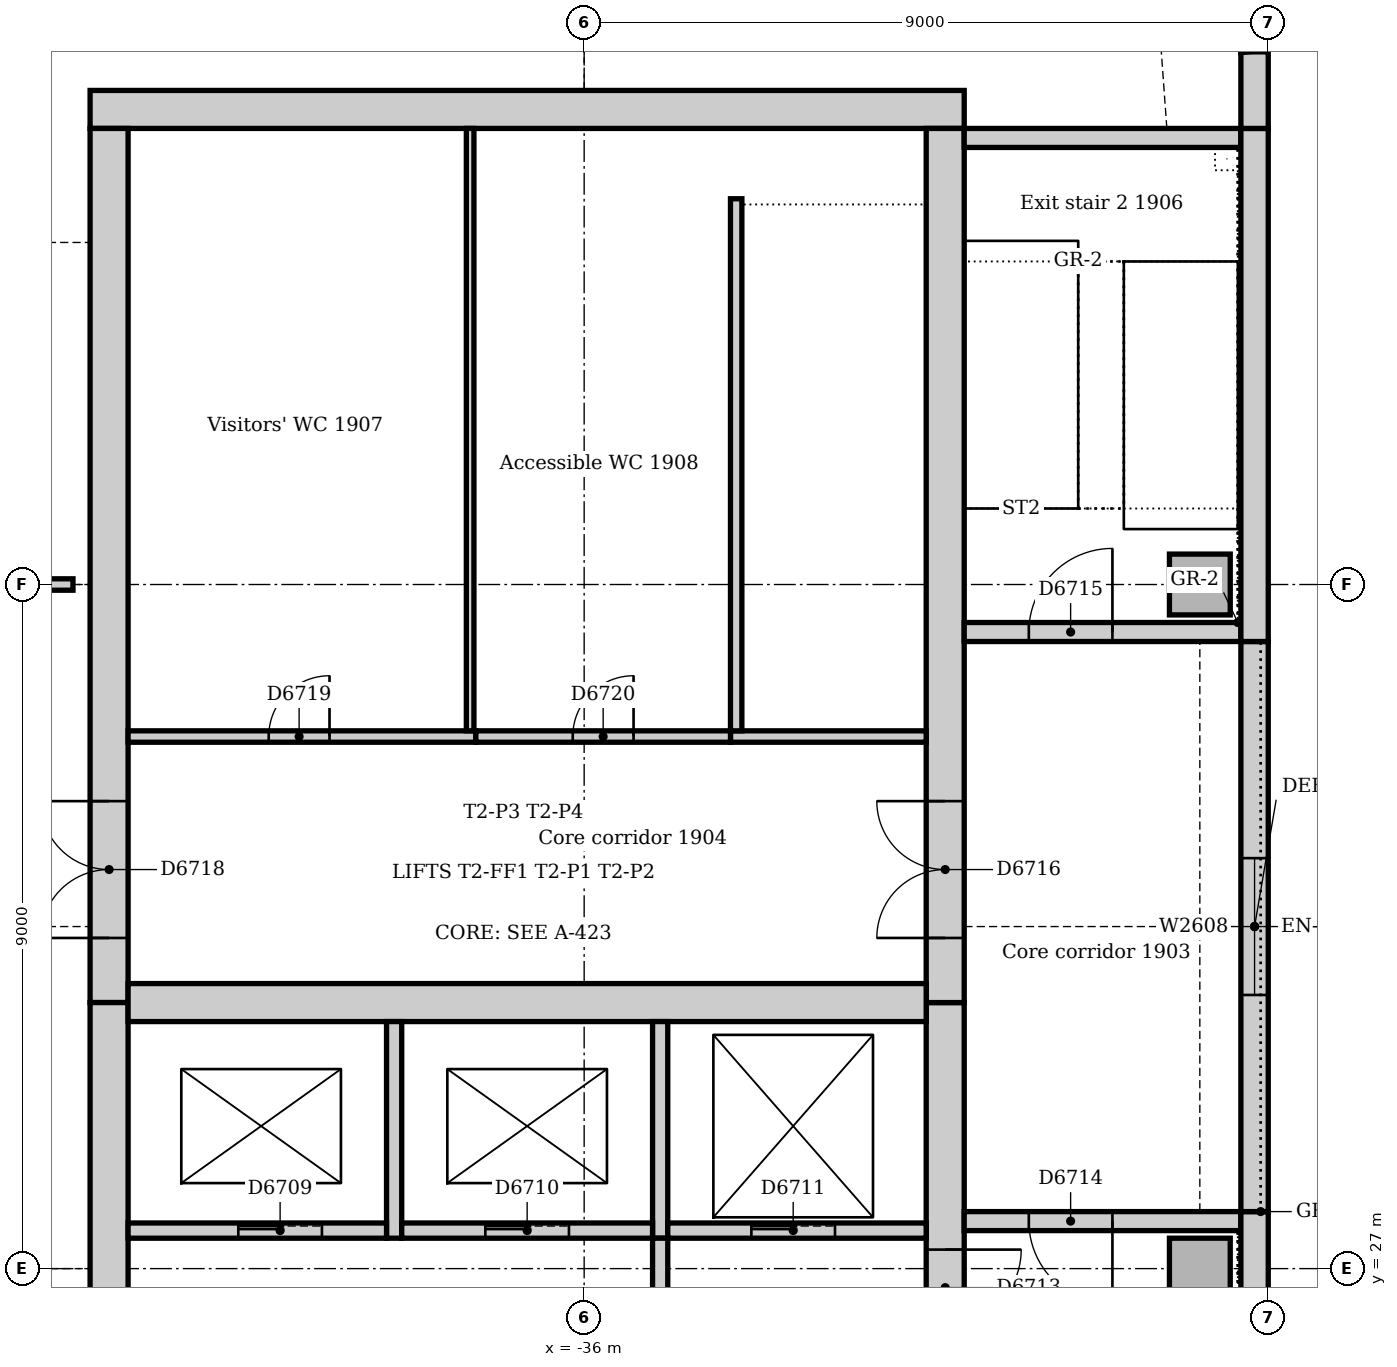
"""IFC4 building model, lengths in metres.
Left out: names, types, materials, properties, quantities, classifications, styles, units other than length and angle.
Written with IfcOpenShell. Run it as: python <this file> out.ifc"""

import sys

from ifc_helpers import new_model, si_unit, direction, frame, frame_2d, origin, origin_2d, place, context, subcontext, project, spatial, rectangle, extrude, element, fill, save


model = new_model("IFC4")
c1 = context("Model", 3, precision=1e-05, world=origin(), true_north=direction((0.0, 1.0)))
c2 = subcontext(c1, "Body", "Model", "MODEL_VIEW")
j1 = project(units=[si_unit("LENGTHUNIT", "METRE"), si_unit("PLANEANGLEUNIT", "RADIAN")], contexts=[c1])
p1 = place(None, origin())
s1 = spatial("IfcSite", under=j1, at=p1, CompositionType="ELEMENT")
p2 = place(p1, origin())
s2 = spatial("IfcBuilding", under=s1, at=p2, CompositionType="ELEMENT")
p3 = place(p2, frame((0.0, 0.0, 83.0)))
s3 = spatial("IfcBuildingStorey", under=s2, at=p3, CompositionType="ELEMENT", Elevation=83.0)
p4 = place(p3, frame((-31.0, 42.25, 0.0), z_axis=(0.0, 0.0, 1.0), x_axis=(-1.0, 0.0, 0.0)))
e1 = element("IfcWall", 1, at=p4, inside=s3, PredefinedType="SOLIDWALL", context=c2, shape_type="SweptSolid", body=[
    extrude(rectangle(XDim=11.5, YDim=0.5, at=frame_2d((5.75, 0.0))), origin(), (0.0, 0.0, 1.0), 4.0),
])
p5 = place(p3, frame((-31.25, 21.0, 0.0), z_axis=(0.0, 0.0, 1.0), x_axis=(0.0, 1.0, 0.0)))
e2 = element("IfcWall", 2, at=p5, inside=s3, PredefinedType="SOLIDWALL", context=c2, shape_type="SweptSolid", body=[
    extrude(rectangle(XDim=9.5, YDim=0.5, at=frame_2d((4.75, 0.0))), origin(), (0.0, 0.0, 1.0), 4.0),
])
p6 = place(p5, frame((5.25, 0.0, 0.0)))
e3 = element("IfcOpeningElement", 3, at=p6, cuts=e2, PredefinedType="OPENING", context=c2, shape_type="SweptSolid", body=[
    extrude(rectangle(XDim=1.0, YDim=2.1, at=frame_2d((0.5, 1.05))), frame((0.0, 0.26, 0.0), z_axis=(0.0, -1.0, 0.0), x_axis=(1.0, 0.0, 0.0)), (0.0, 0.0, 1.0), 0.52),
])
p7 = place(p3, frame((-31.25, 30.5, 0.0), z_axis=(0.0, 0.0, 1.0), x_axis=(0.0, 1.0, 0.0)))
e4 = element("IfcWall", 4, at=p7, inside=s3, PredefinedType="SOLIDWALL", context=c2, shape_type="SweptSolid", body=[
    extrude(rectangle(XDim=11.5, YDim=0.5, at=frame_2d((5.75, 0.0))), origin(), (0.0, 0.0, 1.0), 4.0),
])
p8 = place(p7, frame((0.85, 0.0, 0.0)))
e5 = element("IfcOpeningElement", 5, at=p8, cuts=e4, PredefinedType="OPENING", context=c2, shape_type="SweptSolid", body=[
    extrude(rectangle(XDim=1.8, YDim=2.1, at=frame_2d((0.9, 1.05))), frame((0.0, 0.26, 0.0), z_axis=(0.0, -1.0, 0.0), x_axis=(1.0, 0.0, 0.0)), (0.0, 0.0, 1.0), 0.52),
])
p9 = place(p3, frame((-42.25, 42.0, 0.0), z_axis=(0.0, 0.0, 1.0), x_axis=(0.0, -1.0, 0.0)))
e6 = element("IfcWall", 6, at=p9, inside=s3, PredefinedType="SOLIDWALL", context=c2, shape_type="SweptSolid", body=[
    extrude(rectangle(XDim=11.5, YDim=0.5, at=frame_2d((5.75, 0.0))), origin(), (0.0, 0.0, 1.0), 4.0),
])
p10 = place(p9, frame((8.85, 0.0, 0.0)))
e7 = element("IfcOpeningElement", 7, at=p10, cuts=e6, PredefinedType="OPENING", context=c2, shape_type="SweptSolid", body=[
    extrude(rectangle(XDim=1.8, YDim=2.1, at=frame_2d((0.9, 1.05))), frame((0.0, 0.26, 0.0), z_axis=(0.0, -1.0, 0.0), x_axis=(1.0, 0.0, 0.0)), (0.0, 0.0, 1.0), 0.52),
])
p11 = place(p3, frame((-42.25, 30.5, 0.0), z_axis=(0.0, 0.0, 1.0), x_axis=(0.0, -1.0, 0.0)))
e8 = element("IfcWall", 8, at=p11, inside=s3, PredefinedType="SOLIDWALL", context=c2, shape_type="SweptSolid", body=[
    extrude(rectangle(XDim=9.5, YDim=0.5, at=frame_2d((4.75, 0.0))), origin(), (0.0, 0.0, 1.0), 4.0),
])
p12 = place(p11, frame((3.85, 0.0, 0.0)))
e9 = element("IfcOpeningElement", 9, at=p12, cuts=e8, PredefinedType="OPENING", context=c2, shape_type="SweptSolid", body=[
    extrude(rectangle(XDim=1.8, YDim=2.1, at=frame_2d((0.9, 1.05))), frame((0.0, 0.26, 0.0), z_axis=(0.0, -1.0, 0.0), x_axis=(1.0, 0.0, 0.0)), (0.0, 0.0, 1.0), 0.52),
])
p13 = place(p3, frame((-42.0, 30.5, 0.0), z_axis=(0.0, 0.0, 1.0), x_axis=(1.0, 0.0, 0.0)))
e10 = element("IfcWall", 10, at=p13, inside=s3, PredefinedType="SOLIDWALL", context=c2, shape_type="SweptSolid", body=[
    extrude(rectangle(XDim=10.5, YDim=0.5, at=frame_2d((5.25, 0.0))), origin(), (0.0, 0.0, 1.0), 4.0),
])
p14 = place(p3, frame((-27.36, 27.625, 0.0), z_axis=(0.0, 0.0, 1.0), x_axis=(-1.0, 0.0, 0.0)))
e11 = element("IfcWall", 11, at=p14, inside=s3, PredefinedType="SOLIDWALL", context=c2, shape_type="SweptSolid", body=[
    extrude(rectangle(XDim=3.64, YDim=0.25, at=frame_2d((1.82, 0.0))), origin(), (0.0, 0.0, 1.0), 4.0),
])
p15 = place(p14, frame((1.69, 0.0, 0.0)))
e12 = element("IfcOpeningElement", 12, at=p15, cuts=e11, PredefinedType="OPENING", context=c2, shape_type="SweptSolid", body=[
    extrude(rectangle(XDim=1.1, YDim=2.1, at=frame_2d((0.55, 1.05))), frame((0.0, 0.135, 0.0), z_axis=(0.0, -1.0, 0.0), x_axis=(1.0, 0.0, 0.0)), (0.0, 0.0, 1.0), 0.27),
])
p16 = place(p3, frame((-31.0, 35.375, 0.0), z_axis=(0.0, 0.0, 1.0), x_axis=(1.0, 0.0, 0.0)))
e13 = element("IfcWall", 13, at=p16, inside=s3, PredefinedType="SOLIDWALL", context=c2, shape_type="SweptSolid", body=[
    extrude(rectangle(XDim=3.64, YDim=0.25, at=frame_2d((1.82, 0.0))), origin(), (0.0, 0.0, 1.0), 4.0),
])
p17 = place(p16, frame((0.85, 0.0, 0.0)))
e14 = element("IfcOpeningElement", 14, at=p17, cuts=e13, PredefinedType="OPENING", context=c2, shape_type="SweptSolid", body=[
    extrude(rectangle(XDim=1.1, YDim=2.1, at=frame_2d((0.55, 1.05))), frame((0.0, 0.135, 0.0), z_axis=(0.0, -1.0, 0.0), x_axis=(1.0, 0.0, 0.0)), (0.0, 0.0, 1.0), 0.27),
])
p18 = place(p3, frame((-27.36, 41.875, 0.0), z_axis=(0.0, 0.0, 1.0), x_axis=(-1.0, 0.0, 0.0)))
e15 = element("IfcWall", 15, at=p18, inside=s3, PredefinedType="SOLIDWALL", context=c2, shape_type="SweptSolid", body=[
    extrude(rectangle(XDim=3.64, YDim=0.25, at=frame_2d((1.82, 0.0))), origin(), (0.0, 0.0, 1.0), 4.0),
])
for number, where, z_axis, x_axis in (
    (16, (-27.9, 27.0, 0.0), (0.0, 0.0, 1.0), (1.0, 0.0, 0.0)),
    (17, (-27.9, 36.0, 0.0), (0.0, 0.0, 1.0), (1.0, 0.0, 0.0)),
):
    element("IfcColumn", number, at=place(p3, frame(where, z_axis=z_axis, x_axis=x_axis)), inside=s3, PredefinedType="COLUMN", context=c2, shape_type="SweptSolid", body=[
        extrude(rectangle(XDim=0.8, YDim=0.8, at=origin_2d()), origin(), (0.0, 0.0, 1.0), 4.0),
    ])
p19 = place(p3, frame((-27.18, 21.0, 0.0), z_axis=(0.0, 0.0, 1.0), x_axis=(0.0, 1.0, 0.0)))
e18 = element("IfcWall", 18, at=p19, inside=s3, PredefinedType="STANDARD", context=c2, shape_type="SweptSolid", body=[
    extrude(rectangle(XDim=6.75, YDim=0.36, at=frame_2d((3.375, 0.0))), origin(), (0.0, 0.0, 1.0), 3.85),
])
p20 = place(p3, frame((-27.18, 27.75, 0.0), z_axis=(0.0, 0.0, 1.0), x_axis=(0.0, 1.0, 0.0)))
e19 = element("IfcWall", 19, at=p20, inside=s3, PredefinedType="STANDARD", context=c2, shape_type="SweptSolid", body=[
    extrude(rectangle(XDim=7.5, YDim=0.36, at=frame_2d((3.75, 0.0))), origin(), (0.0, 0.0, 1.0), 3.85),
])
p21 = place(p20, frame((2.85, 0.0, 1.2)))
e20 = element("IfcOpeningElement", 20, at=p21, cuts=e19, PredefinedType="OPENING", context=c2, shape_type="SweptSolid", body=[
    extrude(rectangle(XDim=1.8, YDim=1.2, at=frame_2d((0.9, 0.6))), frame((0.0, 0.19, 0.0), z_axis=(0.0, -1.0, 0.0), x_axis=(1.0, 0.0, 0.0)), (0.0, 0.0, 1.0), 0.38),
])
p22 = place(p3, frame((-27.18, 35.25, 0.0), z_axis=(0.0, 0.0, 1.0), x_axis=(0.0, 1.0, 0.0)))
e21 = element("IfcWall", 21, at=p22, inside=s3, PredefinedType="STANDARD", context=c2, shape_type="SweptSolid", body=[
    extrude(rectangle(XDim=6.75, YDim=0.36, at=frame_2d((3.375, 0.0))), origin(), (0.0, 0.0, 1.0), 3.85),
])
p23 = place(p3, frame((-27.18, 42.0, 0.0), z_axis=(0.0, 0.0, 1.0), x_axis=(0.0, 1.0, 0.0)))
e22 = element("IfcWall", 22, at=p23, inside=s3, PredefinedType="STANDARD", context=c2, shape_type="SweptSolid", body=[
    extrude(rectangle(XDim=1.007, YDim=0.36, at=frame_2d((0.504, 0.0))), origin(), (0.0, 0.0, 1.0), 3.85),
])
p24 = place(p3, frame((-27.183, 43.019, 0.0), z_axis=(0.0, 0.0, 1.0), x_axis=(-0.13055608231, 0.99144092581, 0.0)))
e23 = element("IfcWall", 23, at=p24, inside=s3, PredefinedType="STANDARD", context=c2, shape_type="SweptSolid", body=[
    extrude(rectangle(XDim=0.713, YDim=0.36, at=frame_2d((0.356, 0.0))), origin(), (0.0, 0.0, 1.0), 3.85),
])
p25 = place(p3, frame((-38.5, 27.4, 0.0), z_axis=(0.0, 0.0, 1.0), x_axis=(0.0, 1.0, 0.0)))
e24 = element("IfcWall", 24, at=p25, inside=s3, PredefinedType="SOLIDWALL", context=c2, shape_type="SweptSolid", body=[
    extrude(rectangle(XDim=2.85, YDim=0.2, at=frame_2d((1.425, 0.0))), origin(), (0.0, 0.0, 1.0), 4.0),
])
p26 = place(p3, frame((-42.0, 27.5, 0.0), z_axis=(0.0, 0.0, 1.0), x_axis=(1.0, 0.0, 0.0)))
e25 = element("IfcWall", 25, at=p26, inside=s3, PredefinedType="SOLIDWALL", context=c2, shape_type="SweptSolid", body=[
    extrude(rectangle(XDim=3.4, YDim=0.2, at=frame_2d((1.7, 0.0))), origin(), (0.0, 0.0, 1.0), 4.0),
])
p27 = place(p26, frame((1.45, 0.0, 0.0)))
e26 = element("IfcOpeningElement", 26, at=p27, cuts=e25, PredefinedType="OPENING", context=c2, shape_type="SweptSolid", body=[
    extrude(rectangle(XDim=1.1, YDim=2.1, at=frame_2d((0.55, 1.05))), frame((0.0, 0.11, 0.0), z_axis=(0.0, -1.0, 0.0), x_axis=(1.0, 0.0, 0.0)), (0.0, 0.0, 1.0), 0.22),
])
p28 = place(p3, frame((-35.0, 27.4, 0.0), z_axis=(0.0, 0.0, 1.0), x_axis=(0.0, 1.0, 0.0)))
e27 = element("IfcWall", 27, at=p28, inside=s3, PredefinedType="SOLIDWALL", context=c2, shape_type="SweptSolid", body=[
    extrude(rectangle(XDim=2.85, YDim=0.2, at=frame_2d((1.425, 0.0))), origin(), (0.0, 0.0, 1.0), 4.0),
])
p29 = place(p3, frame((-38.4, 27.5, 0.0), z_axis=(0.0, 0.0, 1.0), x_axis=(1.0, 0.0, 0.0)))
e28 = element("IfcWall", 28, at=p29, inside=s3, PredefinedType="SOLIDWALL", context=c2, shape_type="SweptSolid", body=[
    extrude(rectangle(XDim=3.3, YDim=0.2, at=frame_2d((1.65, 0.0))), origin(), (0.0, 0.0, 1.0), 4.0),
])
p30 = place(p29, frame((1.1, 0.0, 0.0)))
e29 = element("IfcOpeningElement", 29, at=p30, cuts=e28, PredefinedType="OPENING", context=c2, shape_type="SweptSolid", body=[
    extrude(rectangle(XDim=1.1, YDim=2.1, at=frame_2d((0.55, 1.05))), frame((0.0, 0.11, 0.0), z_axis=(0.0, -1.0, 0.0), x_axis=(1.0, 0.0, 0.0)), (0.0, 0.0, 1.0), 0.22),
])
p31 = place(p3, frame((-34.9, 27.5, 0.0), z_axis=(0.0, 0.0, 1.0), x_axis=(1.0, 0.0, 0.0)))
e30 = element("IfcWall", 30, at=p31, inside=s3, PredefinedType="SOLIDWALL", context=c2, shape_type="SweptSolid", body=[
    extrude(rectangle(XDim=3.4, YDim=0.2, at=frame_2d((1.7, 0.0))), origin(), (0.0, 0.0, 1.0), 4.0),
])
p32 = place(p31, frame((1.1, 0.0, 0.0)))
e31 = element("IfcOpeningElement", 31, at=p32, cuts=e30, PredefinedType="OPENING", context=c2, shape_type="SweptSolid", body=[
    extrude(rectangle(XDim=1.1, YDim=2.1, at=frame_2d((0.55, 1.05))), frame((0.0, 0.11, 0.0), z_axis=(0.0, -1.0, 0.0), x_axis=(1.0, 0.0, 0.0)), (0.0, 0.0, 1.0), 0.22),
])
p33 = place(p3, frame((-35.0, 24.1, 0.0), z_axis=(0.0, 0.0, 1.0), x_axis=(0.0, 1.0, 0.0)))
e32 = element("IfcWall", 32, at=p33, inside=s3, PredefinedType="SOLIDWALL", context=c2, shape_type="SweptSolid", body=[
    extrude(rectangle(XDim=3.3, YDim=0.2, at=frame_2d((1.65, 0.0))), origin(), (0.0, 0.0, 1.0), 4.0),
])
p34 = place(p33, frame((1.15, 0.0, 0.0)))
e33 = element("IfcOpeningElement", 33, at=p34, cuts=e32, PredefinedType="OPENING", context=c2, shape_type="SweptSolid", body=[
    extrude(rectangle(XDim=1.0, YDim=2.1, at=frame_2d((0.5, 1.05))), frame((0.0, 0.11, 0.0), z_axis=(0.0, -1.0, 0.0), x_axis=(1.0, 0.0, 0.0)), (0.0, 0.0, 1.0), 0.22),
])
p35 = place(p3, frame((-34.075, 34.0, 0.0), z_axis=(0.0, 0.0, 1.0), x_axis=(1.0, 0.0, 0.0)))
e34 = element("IfcWall", 34, at=p35, inside=s3, PredefinedType="SOLIDWALL", context=c2, shape_type="SweptSolid", body=[
    extrude(rectangle(XDim=2.575, YDim=0.15, at=frame_2d((1.288, 0.0))), origin(), (0.0, 0.0, 1.0), 4.0),
])
p36 = place(p3, frame((-34.0, 41.075, 0.0), z_axis=(0.0, 0.0, 1.0), x_axis=(0.0, -1.0, 0.0)))
e35 = element("IfcWall", 35, at=p36, inside=s3, PredefinedType="SOLIDWALL", context=c2, shape_type="SweptSolid", body=[
    extrude(rectangle(XDim=7.0, YDim=0.15, at=frame_2d((3.5, 0.0))), origin(), (0.0, 0.0, 1.0), 4.0),
])
p37 = place(p3, frame((-37.425, 34.0, 0.0), z_axis=(0.0, 0.0, 1.0), x_axis=(-1.0, 0.0, 0.0)))
e36 = element("IfcWall", 36, at=p37, inside=s3, PredefinedType="PARTITIONING", context=c2, shape_type="SweptSolid", body=[
    extrude(rectangle(XDim=4.575, YDim=0.15, at=frame_2d((2.288, 0.0))), origin(), (0.0, 0.0, 1.0), 3.85),
])
p38 = place(p37, frame((1.925, 0.0, 0.0)))
e37 = element("IfcOpeningElement", 37, at=p38, cuts=e36, PredefinedType="OPENING", context=c2, shape_type="SweptSolid", body=[
    extrude(rectangle(XDim=0.8, YDim=2.1, at=frame_2d((0.4, 1.05))), frame((0.0, 0.085, 0.0), z_axis=(0.0, -1.0, 0.0), x_axis=(1.0, 0.0, 0.0)), (0.0, 0.0, 1.0), 0.17),
])
p39 = place(p3, frame((-34.075, 34.0, 0.0), z_axis=(0.0, 0.0, 1.0), x_axis=(-1.0, 0.0, 0.0)))
e38 = element("IfcWall", 38, at=p39, inside=s3, PredefinedType="PARTITIONING", context=c2, shape_type="SweptSolid", body=[
    extrude(rectangle(XDim=3.35, YDim=0.15, at=frame_2d((1.675, 0.0))), origin(), (0.0, 0.0, 1.0), 3.85),
])
p40 = place(p39, frame((1.275, 0.0, 0.0)))
e39 = element("IfcOpeningElement", 39, at=p40, cuts=e38, PredefinedType="OPENING", context=c2, shape_type="SweptSolid", body=[
    extrude(rectangle(XDim=0.8, YDim=2.1, at=frame_2d((0.4, 1.05))), frame((0.0, 0.085, 0.0), z_axis=(0.0, -1.0, 0.0), x_axis=(1.0, 0.0, 0.0)), (0.0, 0.0, 1.0), 0.17),
])
p41 = place(p3, frame((-37.5, 34.075, 0.0), z_axis=(0.0, 0.0, 1.0), x_axis=(0.0, 1.0, 0.0)))
e40 = element("IfcWall", 40, at=p41, inside=s3, PredefinedType="PARTITIONING", context=c2, shape_type="SweptSolid", body=[
    extrude(rectangle(XDim=7.925, YDim=0.1, at=frame_2d((3.962, 0.0))), origin(), (0.0, 0.0, 1.0), 3.85),
])
p42 = place(p3, frame((-44.65, 36.0, 0.0), z_axis=(0.0, 0.0, 1.0), x_axis=(1.0, 0.0, 0.0)))
e41 = element("IfcWall", 41, at=p42, inside=s3, PredefinedType="PARTITIONING", context=c2, shape_type="SweptSolid", body=[
    extrude(rectangle(XDim=1.925, YDim=0.15, at=frame_2d((0.963, 0.0))), origin(), (0.0, 0.0, 1.0), 3.602),
])
p43 = place(p42, frame((0.5, 0.0, 0.0)))
e42 = element("IfcOpeningElement", 42, at=p43, cuts=e41, PredefinedType="OPENING", context=c2, shape_type="SweptSolid", body=[
    extrude(rectangle(XDim=0.9, YDim=2.1, at=frame_2d((0.45, 1.05))), frame((0.0, 0.085, 0.0), z_axis=(0.0, -1.0, 0.0), x_axis=(1.0, 0.0, 0.0)), (0.0, 0.0, 1.0), 0.17),
])
p44 = place(p21, origin())
e43 = element("IfcWindow", 43, at=p44, inside=s3, PartitioningType="SINGLE_PANEL", PredefinedType="WINDOW", context=c2, shape_type="SweptSolid", body=[
    extrude(rectangle(XDim=1.8, YDim=1.2, at=frame_2d((0.9, 0.6))), frame((0.0, 0.13, 0.0), z_axis=(0.0, -1.0, 0.0), x_axis=(1.0, 0.0, 0.0)), (0.0, 0.0, 1.0), 0.06),
])
fill(e20, e43)
p45 = place(p27, origin())
e44 = element("IfcDoor", 44, at=p45, inside=s3, OperationType="SLIDING_TO_LEFT", PredefinedType="DOOR", context=c2, shape_type="SweptSolid", body=[
    extrude(rectangle(XDim=1.1, YDim=2.1, at=frame_2d((0.55, 1.05))), frame((0.0, 0.025, 0.0), z_axis=(0.0, -1.0, 0.0), x_axis=(1.0, 0.0, 0.0)), (0.0, 0.0, 1.0), 0.05),
])
fill(e26, e44)
p46 = place(p30, origin())
e45 = element("IfcDoor", 45, at=p46, inside=s3, OperationType="SLIDING_TO_LEFT", PredefinedType="DOOR", context=c2, shape_type="SweptSolid", body=[
    extrude(rectangle(XDim=1.1, YDim=2.1, at=frame_2d((0.55, 1.05))), frame((0.0, 0.025, 0.0), z_axis=(0.0, -1.0, 0.0), x_axis=(1.0, 0.0, 0.0)), (0.0, 0.0, 1.0), 0.05),
])
fill(e29, e45)
p47 = place(p32, origin())
e46 = element("IfcDoor", 46, at=p47, inside=s3, OperationType="SLIDING_TO_LEFT", PredefinedType="DOOR", context=c2, shape_type="SweptSolid", body=[
    extrude(rectangle(XDim=1.1, YDim=2.1, at=frame_2d((0.55, 1.05))), frame((0.0, 0.025, 0.0), z_axis=(0.0, -1.0, 0.0), x_axis=(1.0, 0.0, 0.0)), (0.0, 0.0, 1.0), 0.05),
])
fill(e31, e46)
p48 = place(p6, frame((1.0, 0.0, 0.0), z_axis=(0.0, 0.0, 1.0), x_axis=(-1.0, 0.0, 0.0)))
e47 = element("IfcDoor", 47, at=p48, inside=s3, OperationType="SINGLE_SWING_LEFT", PredefinedType="DOOR", context=c2, shape_type="SweptSolid", body=[
    extrude(rectangle(XDim=1.0, YDim=2.1, at=frame_2d((0.5, 1.05))), frame((0.0, 0.025, 0.0), z_axis=(0.0, -1.0, 0.0), x_axis=(1.0, 0.0, 0.0)), (0.0, 0.0, 1.0), 0.05),
])
fill(e3, e47)
p49 = place(p15, origin())
e48 = element("IfcDoor", 48, at=p49, inside=s3, OperationType="SINGLE_SWING_LEFT", PredefinedType="DOOR", context=c2, shape_type="SweptSolid", body=[
    extrude(rectangle(XDim=1.1, YDim=2.1, at=frame_2d((0.55, 1.05))), frame((0.0, 0.025, 0.0), z_axis=(0.0, -1.0, 0.0), x_axis=(1.0, 0.0, 0.0)), (0.0, 0.0, 1.0), 0.05),
])
fill(e12, e48)
p50 = place(p17, origin())
e49 = element("IfcDoor", 49, at=p50, inside=s3, OperationType="SINGLE_SWING_RIGHT", PredefinedType="DOOR", context=c2, shape_type="SweptSolid", body=[
    extrude(rectangle(XDim=1.1, YDim=2.1, at=frame_2d((0.55, 1.05))), frame((0.0, 0.025, 0.0), z_axis=(0.0, -1.0, 0.0), x_axis=(1.0, 0.0, 0.0)), (0.0, 0.0, 1.0), 0.05),
])
fill(e14, e49)
p51 = place(p8, origin())
e50 = element("IfcDoor", 50, at=p51, inside=s3, OperationType="DOUBLE_DOOR_SINGLE_SWING", PredefinedType="DOOR", context=c2, shape_type="SweptSolid", body=[
    extrude(rectangle(XDim=1.8, YDim=2.1, at=frame_2d((0.9, 1.05))), frame((0.0, 0.025, 0.0), z_axis=(0.0, -1.0, 0.0), x_axis=(1.0, 0.0, 0.0)), (0.0, 0.0, 1.0), 0.05),
])
fill(e5, e50)
p52 = place(p10, frame((1.8, 0.0, 0.0), z_axis=(0.0, 0.0, 1.0), x_axis=(-1.0, 0.0, 0.0)))
e51 = element("IfcDoor", 51, at=p52, inside=s3, OperationType="DOUBLE_DOOR_SINGLE_SWING", PredefinedType="DOOR", context=c2, shape_type="SweptSolid", body=[
    extrude(rectangle(XDim=1.8, YDim=2.1, at=frame_2d((0.9, 1.05))), frame((0.0, 0.025, 0.0), z_axis=(0.0, -1.0, 0.0), x_axis=(1.0, 0.0, 0.0)), (0.0, 0.0, 1.0), 0.05),
])
fill(e7, e51)
p53 = place(p38, frame((0.8, 0.0, 0.0), z_axis=(0.0, 0.0, 1.0), x_axis=(-1.0, 0.0, 0.0)))
e52 = element("IfcDoor", 52, at=p53, inside=s3, OperationType="SINGLE_SWING_RIGHT", PredefinedType="DOOR", context=c2, shape_type="SweptSolid", body=[
    extrude(rectangle(XDim=0.8, YDim=2.1, at=frame_2d((0.4, 1.05))), frame((0.0, 0.025, 0.0), z_axis=(0.0, -1.0, 0.0), x_axis=(1.0, 0.0, 0.0)), (0.0, 0.0, 1.0), 0.05),
])
fill(e37, e52)
p54 = place(p40, frame((0.8, 0.0, 0.0), z_axis=(0.0, 0.0, 1.0), x_axis=(-1.0, 0.0, 0.0)))
e53 = element("IfcDoor", 53, at=p54, inside=s3, OperationType="SINGLE_SWING_RIGHT", PredefinedType="DOOR", context=c2, shape_type="SweptSolid", body=[
    extrude(rectangle(XDim=0.8, YDim=2.1, at=frame_2d((0.4, 1.05))), frame((0.0, 0.025, 0.0), z_axis=(0.0, -1.0, 0.0), x_axis=(1.0, 0.0, 0.0)), (0.0, 0.0, 1.0), 0.05),
])
fill(e39, e53)
save(model, sys.argv[1])
